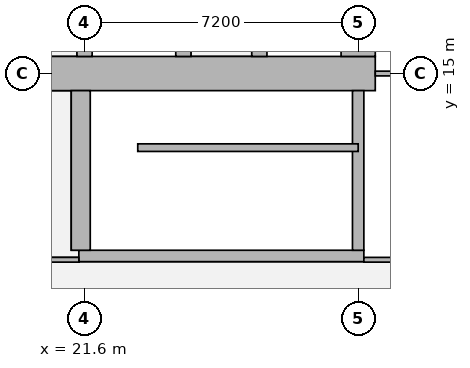
"""IFC4 building model, lengths in metres.
Left out: names, types, materials, properties, quantities, classifications, styles, units other than length and angle.
Written with IfcOpenShell. Run it as: python <this file> out.ifc"""

import sys

from ifc_helpers import new_model, si_unit, direction, frame, frame_2d, origin, place, context, subcontext, project, spatial, rectangle, extrude, element, fill, save


model = new_model("IFC4")
c1 = context("Model", 3, precision=1e-05, world=origin(), true_north=direction((0.0, 1.0)))
c2 = subcontext(c1, "Body", "Model", "MODEL_VIEW")
j1 = project(units=[si_unit("LENGTHUNIT", "METRE"), si_unit("PLANEANGLEUNIT", "RADIAN")], contexts=[c1])
p1 = place(None, origin())
s1 = spatial("IfcSite", under=j1, at=p1, CompositionType="ELEMENT")
p2 = place(p1, origin())
s2 = spatial("IfcBuilding", under=s1, at=p2, CompositionType="ELEMENT")
p3 = place(p2, frame((0.0, 0.0, 31.25)))
s3 = spatial("IfcBuildingStorey", under=s2, at=p3, CompositionType="ELEMENT", Elevation=31.25)
p4 = place(p3, frame((13.95, 15.0, 0.0), z_axis=(0.0, 0.0, 1.0), x_axis=(1.0, 0.0, 0.0)))
e1 = element("IfcWall", 1, at=p4, inside=s3, PredefinedType="SHEAR", context=c2, shape_type="SweptSolid", body=[
    extrude(rectangle(XDim=15.3, YDim=0.9, at=frame_2d((7.65, 0.0))), origin(), (0.0, 0.0, 1.0), 3.75),
])
p5 = place(p4, frame((4.45, 0.0, 0.0)))
e2 = element("IfcOpeningElement", 2, at=p5, cuts=e1, PredefinedType="OPENING", context=c2, shape_type="SweptSolid", body=[
    extrude(rectangle(XDim=1.8, YDim=2.1, at=frame_2d((0.9, 1.05))), frame((0.0, 0.46, 0.0), z_axis=(0.0, -1.0, 0.0), x_axis=(1.0, 0.0, 0.0)), (0.0, 0.0, 1.0), 0.92),
])
p6 = place(p4, frame((10.7, 0.0, 0.0)))
e3 = element("IfcOpeningElement", 3, at=p6, cuts=e1, PredefinedType="OPENING", context=c2, shape_type="SweptSolid", body=[
    extrude(rectangle(XDim=1.1, YDim=2.1, at=frame_2d((0.55, 1.05))), frame((0.0, 0.46, 0.0), z_axis=(0.0, -1.0, 0.0), x_axis=(1.0, 0.0, 0.0)), (0.0, 0.0, 1.0), 0.92),
])
p7 = place(p3, frame((28.8, 15.45, 0.0), z_axis=(0.0, 0.0, 1.0), x_axis=(0.0, 1.0, 0.0)))
e4 = element("IfcWall", 4, at=p7, inside=s3, PredefinedType="SHEAR", context=c2, shape_type="SweptSolid", body=[
    extrude(rectangle(XDim=14.1, YDim=0.9, at=frame_2d((7.05, 0.0))), origin(), (0.0, 0.0, 1.0), 3.75),
])
for number, where, z_axis, x_axis in (
    (5, (21.6, 15.45, 0.0), (0.0, 0.0, 1.0), (0.0, 1.0, 0.0)),
    (6, (24.2, 15.45, 0.0), (0.0, 0.0, 1.0), (0.0, 1.0, 0.0)),
):
    element("IfcWall", number, at=place(p3, frame(where, z_axis=z_axis, x_axis=x_axis)), inside=s3, PredefinedType="SHEAR", context=c2, shape_type="SweptSolid", body=[
        extrude(rectangle(XDim=14.1, YDim=0.4, at=frame_2d((7.05, 0.0))), origin(), (0.0, 0.0, 1.0), 3.75),
    ])
p8 = place(p3, frame((26.2, 15.45, 0.0), z_axis=(0.0, 0.0, 1.0), x_axis=(0.0, 1.0, 0.0)))
e7 = element("IfcWall", 7, at=p8, inside=s3, PredefinedType="SHEAR", context=c2, shape_type="SweptSolid", body=[
    extrude(rectangle(XDim=3.1, YDim=0.4, at=frame_2d((1.55, 0.0))), origin(), (0.0, 0.0, 1.0), 3.75),
])
p9 = place(p8, frame((0.825, 0.0, 0.0)))
e8 = element("IfcOpeningElement", 8, at=p9, cuts=e7, PredefinedType="OPENING", context=c2, shape_type="SweptSolid", body=[
    extrude(rectangle(XDim=1.2, YDim=2.1, at=frame_2d((0.6, 1.05))), frame((0.0, 0.21, 0.0), z_axis=(0.0, -1.0, 0.0), x_axis=(1.0, 0.0, 0.0)), (0.0, 0.0, 1.0), 0.42),
])
p10 = place(p3, frame((21.45, 10.2, 0.0), z_axis=(0.0, 0.0, 1.0), x_axis=(1.0, 0.0, 0.0)))
e9 = element("IfcWall", 9, at=p10, inside=s3, PredefinedType="SHEAR", context=c2, shape_type="SweptSolid", body=[
    extrude(rectangle(XDim=7.5, YDim=0.3, at=frame_2d((3.75, 0.0))), origin(), (0.0, 0.0, 1.0), 3.75),
])
p11 = place(p10, frame((0.5, 0.0, 0.0)))
e10 = element("IfcOpeningElement", 10, at=p11, cuts=e9, PredefinedType="OPENING", context=c2, shape_type="SweptSolid", body=[
    extrude(rectangle(XDim=1.1, YDim=2.1, at=frame_2d((0.55, 1.05))), frame((0.0, 0.16, 0.0), z_axis=(0.0, -1.0, 0.0), x_axis=(1.0, 0.0, 0.0)), (0.0, 0.0, 1.0), 0.32),
])
p12 = place(p3, frame((21.5, 10.35, 0.0), z_axis=(0.0, 0.0, 1.0), x_axis=(0.0, 1.0, 0.0)))
e11 = element("IfcWall", 11, at=p12, inside=s3, PredefinedType="SHEAR", context=c2, shape_type="SweptSolid", body=[
    extrude(rectangle(XDim=4.2, YDim=0.5, at=frame_2d((2.1, 0.0))), origin(), (0.0, 0.0, 1.0), 3.75),
])
p13 = place(p3, frame((28.8, 10.35, 0.0), z_axis=(0.0, 0.0, 1.0), x_axis=(0.0, 1.0, 0.0)))
e12 = element("IfcWall", 12, at=p13, inside=s3, PredefinedType="SHEAR", context=c2, shape_type="SweptSolid", body=[
    extrude(rectangle(XDim=4.2, YDim=0.3, at=frame_2d((2.1, 0.0))), origin(), (0.0, 0.0, 1.0), 3.75),
])
p14 = place(p3, frame((10.163, 10.1, 0.0), z_axis=(0.0, 0.0, 1.0), x_axis=(1.0, 0.0, 0.0)))
e13 = element("IfcWall", 13, at=p14, inside=s3, PredefinedType="PARTITIONING", context=c2, shape_type="SweptSolid", body=[
    extrude(rectangle(XDim=11.287, YDim=0.125, at=frame_2d((5.644, 0.0))), origin(), (0.0, 0.0, 1.0), 3.5),
])
p15 = place(p14, frame((7.832, 0.0, 0.0)))
e14 = element("IfcOpeningElement", 14, at=p15, cuts=e13, PredefinedType="OPENING", context=c2, shape_type="SweptSolid", body=[
    extrude(rectangle(XDim=1.8, YDim=2.1, at=frame_2d((0.9, 1.05))), frame((0.0, 0.073, 0.0), z_axis=(0.0, -1.0, 0.0), x_axis=(1.0, 0.0, 0.0)), (0.0, 0.0, 1.0), 0.145),
])
p16 = place(p3, frame((28.95, 10.1, 0.0), z_axis=(0.0, 0.0, 1.0), x_axis=(1.0, 0.0, 0.0)))
e15 = element("IfcWall", 15, at=p16, inside=s3, PredefinedType="PARTITIONING", context=c2, shape_type="SweptSolid", body=[
    extrude(rectangle(XDim=9.188, YDim=0.125, at=frame_2d((4.594, 0.0))), origin(), (0.0, 0.0, 1.0), 3.5),
])
p17 = place(p3, frame((29.25, 15.0, 0.0), z_axis=(0.0, 0.0, 1.0), x_axis=(1.0, 0.0, 0.0)))
e16 = element("IfcWall", 16, at=p17, inside=s3, PredefinedType="PARTITIONING", context=c2, shape_type="SweptSolid", body=[
    extrude(rectangle(XDim=5.849, YDim=0.125, at=frame_2d((2.925, 0.0))), origin(), (0.0, 0.0, 1.0), 3.5),
])
p18 = place(p3, frame((23.0, 13.05, 0.0), z_axis=(0.0, 0.0, 1.0), x_axis=(1.0, 0.0, 0.0)))
e17 = element("IfcWall", 17, at=p18, inside=s3, PredefinedType="SHEAR", context=c2, shape_type="SweptSolid", body=[
    extrude(rectangle(XDim=5.8, YDim=0.2, at=frame_2d((2.9, 0.0))), origin(), (0.0, 0.0, 1.0), 3.75),
])
p19 = place(p6, origin())
e18 = element("IfcDoor", 18, at=p19, inside=s3, OperationType="SINGLE_SWING_RIGHT", PredefinedType="DOOR", context=c2, shape_type="SweptSolid", body=[
    extrude(rectangle(XDim=1.1, YDim=2.1, at=frame_2d((0.55, 1.05))), frame((0.0, 0.025, 0.0), z_axis=(0.0, -1.0, 0.0), x_axis=(1.0, 0.0, 0.0)), (0.0, 0.0, 1.0), 0.05),
])
fill(e3, e18)
p20 = place(p11, origin())
e19 = element("IfcDoor", 19, at=p20, inside=s3, OperationType="SINGLE_SWING_LEFT", PredefinedType="DOOR", context=c2, shape_type="SweptSolid", body=[
    extrude(rectangle(XDim=1.1, YDim=2.1, at=frame_2d((0.55, 1.05))), frame((0.0, 0.025, 0.0), z_axis=(0.0, -1.0, 0.0), x_axis=(1.0, 0.0, 0.0)), (0.0, 0.0, 1.0), 0.05),
])
fill(e10, e19)
save(model, sys.argv[1])
